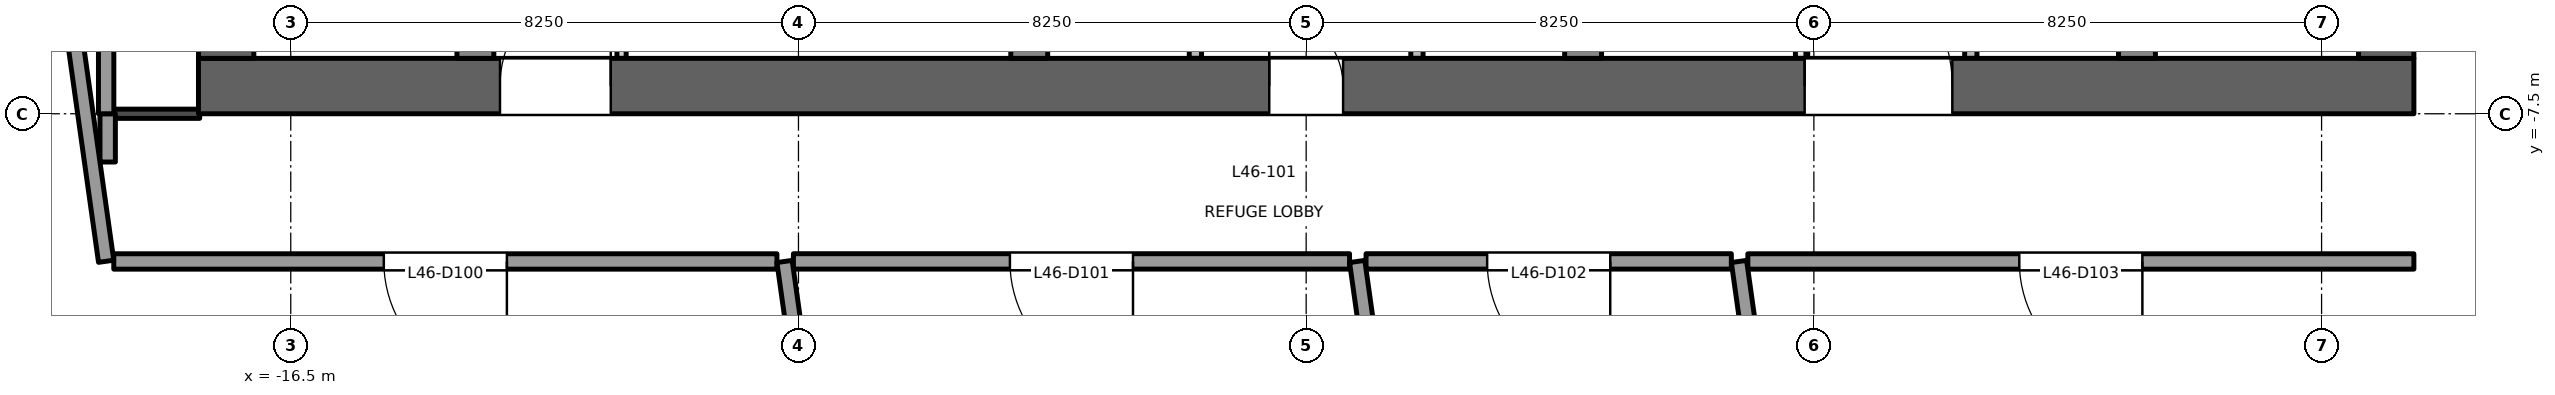
"""IFC4 building model, lengths in metres.
Left out: names, types, materials, properties, quantities, classifications, styles, units other than length and angle.
Written with IfcOpenShell. Run it as: python <this file> out.ifc"""

import sys

from ifc_helpers import new_model, si_unit, direction, frame, frame_2d, origin, place, context, subcontext, project, spatial, rectangle, extrude, element, fill, save


model = new_model("IFC4")
c1 = context("Model", 3, precision=1e-05, world=origin(), true_north=direction((0.0, 1.0)))
c2 = subcontext(c1, "Body", "Model", "MODEL_VIEW")
j1 = project(units=[si_unit("LENGTHUNIT", "METRE"), si_unit("PLANEANGLEUNIT", "RADIAN")], contexts=[c1])
p1 = place(None, origin())
s1 = spatial("IfcSite", under=j1, at=p1, CompositionType="ELEMENT")
p2 = place(p1, origin())
s2 = spatial("IfcBuilding", under=s1, at=p2, CompositionType="ELEMENT")
p3 = place(p2, frame((0.0, 0.0, 199.7)))
s3 = spatial("IfcBuildingStorey", under=s2, at=p3, CompositionType="ELEMENT", Elevation=199.7)
p4 = place(p3, frame((-18.0, -7.05, -0.2), z_axis=(0.0, 0.0, 1.0), x_axis=(1.0, 0.0, 0.0)))
e1 = element("IfcWall", 1, at=p4, inside=s3, PredefinedType="SHEAR", context=c2, shape_type="SweptSolid", body=[
    extrude(rectangle(XDim=36.0, YDim=0.9, at=frame_2d((18.0, 0.0))), origin(), (0.0, 0.0, 1.0), 8.4),
])
p5 = place(p4, frame((4.9, 0.0, 0.2)))
e2 = element("IfcOpeningElement", 2, at=p5, cuts=e1, PredefinedType="OPENING", context=c2, shape_type="SweptSolid", body=[
    extrude(rectangle(XDim=1.8, YDim=2.1, at=frame_2d((0.9, 1.05))), frame((0.0, 0.46, 0.0), z_axis=(0.0, -1.0, 0.0), x_axis=(1.0, 0.0, 0.0)), (0.0, 0.0, 1.0), 0.921),
])
p6 = place(p4, frame((17.4, 0.0, 0.2)))
e3 = element("IfcOpeningElement", 3, at=p6, cuts=e1, PredefinedType="OPENING", context=c2, shape_type="SweptSolid", body=[
    extrude(rectangle(XDim=1.2, YDim=2.1, at=frame_2d((0.6, 1.05))), frame((0.0, 0.46, 0.0), z_axis=(0.0, -1.0, 0.0), x_axis=(1.0, 0.0, 0.0)), (0.0, 0.0, 1.0), 0.921),
])
p7 = place(p4, frame((26.1, 0.0, 0.2)))
e4 = element("IfcOpeningElement", 4, at=p7, cuts=e1, PredefinedType="OPENING", context=c2, shape_type="SweptSolid", body=[
    extrude(rectangle(XDim=2.4, YDim=2.1, at=frame_2d((1.2, 1.05))), frame((0.0, 0.46, 0.0), z_axis=(0.0, -1.0, 0.0), x_axis=(1.0, 0.0, 0.0)), (0.0, 0.0, 1.0), 0.921),
])
p8 = place(p3, frame((-17.55, -6.6, -0.2), z_axis=(0.0, 0.0, 1.0), x_axis=(0.0, 1.0, 0.0)))
e5 = element("IfcWall", 5, at=p8, inside=s3, PredefinedType="SHEAR", context=c2, shape_type="SweptSolid", body=[
    extrude(rectangle(XDim=13.2, YDim=0.9, at=frame_2d((6.6, 0.0))), origin(), (0.0, 0.0, 1.0), 8.4),
])
p9 = place(p8, frame((4.55, 0.0, 0.2)))
e6 = element("IfcOpeningElement", 6, at=p9, cuts=e5, PredefinedType="OPENING", context=c2, shape_type="SweptSolid", body=[
    extrude(rectangle(XDim=1.2, YDim=2.1, at=frame_2d((0.6, 1.05))), frame((0.0, 0.46, 0.0), z_axis=(0.0, -1.0, 0.0), x_axis=(1.0, 0.0, 0.0)), (0.0, 0.0, 1.0), 0.921),
])
p10 = place(p3, frame((17.55, -6.6, -0.2), z_axis=(0.0, 0.0, 1.0), x_axis=(0.0, 1.0, 0.0)))
e7 = element("IfcWall", 7, at=p10, inside=s3, PredefinedType="SHEAR", context=c2, shape_type="SweptSolid", body=[
    extrude(rectangle(XDim=13.2, YDim=0.9, at=frame_2d((6.6, 0.0))), origin(), (0.0, 0.0, 1.0), 8.4),
])
p11 = place(p10, frame((4.55, 0.0, 0.2)))
e8 = element("IfcOpeningElement", 8, at=p11, cuts=e7, PredefinedType="OPENING", context=c2, shape_type="SweptSolid", body=[
    extrude(rectangle(XDim=1.2, YDim=2.1, at=frame_2d((0.6, 1.05))), frame((0.0, 0.46, 0.0), z_axis=(0.0, -1.0, 0.0), x_axis=(1.0, 0.0, 0.0)), (0.0, 0.0, 1.0), 0.921),
])
for number, where, z_axis, x_axis in (
    (9, (-13.5, -6.6, -0.2), (0.0, 0.0, 1.0), (0.0, 1.0, 0.0)),
    (10, (-4.5, -6.6, -0.2), (0.0, 0.0, 1.0), (0.0, 1.0, 0.0)),
    (11, (4.5, -6.6, -0.2), (0.0, 0.0, 1.0), (0.0, 1.0, 0.0)),
    (12, (13.5, -6.6, -0.2), (0.0, 0.0, 1.0), (0.0, 1.0, 0.0)),
):
    element("IfcWall", number, at=place(p3, frame(where, z_axis=z_axis, x_axis=x_axis)), inside=s3, PredefinedType="SHEAR", context=c2, shape_type="SweptSolid", body=[
        extrude(rectangle(XDim=13.2, YDim=0.6, at=frame_2d((6.6, 0.0))), origin(), (0.0, 0.0, 1.0), 8.4),
    ])
p12 = place(p3, frame((-11.125, -6.6, 0.0), z_axis=(0.0, 0.0, 1.0), x_axis=(0.0, 1.0, 0.0)))
e13 = element("IfcWall", 13, at=p12, inside=s3, PredefinedType="PARTITIONING", context=c2, shape_type="SweptSolid", body=[
    extrude(rectangle(XDim=13.2, YDim=0.15, at=frame_2d((6.6, 0.0))), origin(), (0.0, 0.0, 1.0), 8.2),
])
p13 = place(p12, frame((2.85, 0.0, 0.0)))
e14 = element("IfcOpeningElement", 14, at=p13, cuts=e13, PredefinedType="OPENING", context=c2, shape_type="SweptSolid", body=[
    extrude(rectangle(XDim=0.9, YDim=2.1, at=frame_2d((0.45, 1.05))), frame((0.0, 0.085, 0.0), z_axis=(0.0, -1.0, 0.0), x_axis=(1.0, 0.0, 0.0)), (0.0, 0.0, 1.0), 0.171),
])
p14 = place(p12, frame((7.8, 0.0, 0.0)))
e15 = element("IfcOpeningElement", 15, at=p14, cuts=e13, PredefinedType="OPENING", context=c2, shape_type="SweptSolid", body=[
    extrude(rectangle(XDim=0.9, YDim=2.1, at=frame_2d((0.45, 1.05))), frame((0.0, 0.085, 0.0), z_axis=(0.0, -1.0, 0.0), x_axis=(1.0, 0.0, 0.0)), (0.0, 0.0, 1.0), 0.171),
])
p15 = place(p12, frame((11.1, 0.0, 0.0)))
e16 = element("IfcOpeningElement", 16, at=p15, cuts=e13, PredefinedType="OPENING", context=c2, shape_type="SweptSolid", body=[
    extrude(rectangle(XDim=0.9, YDim=2.1, at=frame_2d((0.45, 1.05))), frame((0.0, 0.085, 0.0), z_axis=(0.0, -1.0, 0.0), x_axis=(1.0, 0.0, 0.0)), (0.0, 0.0, 1.0), 0.171),
])
p16 = place(p3, frame((-1.8, -6.6, 0.0), z_axis=(0.0, 0.0, 1.0), x_axis=(0.0, 1.0, 0.0)))
e17 = element("IfcWall", 17, at=p16, inside=s3, PredefinedType="PARTITIONING", context=c2, shape_type="SweptSolid", body=[
    extrude(rectangle(XDim=13.2, YDim=0.2, at=frame_2d((6.6, 0.0))), origin(), (0.0, 0.0, 1.0), 8.2),
])
p17 = place(p16, frame((0.55, 0.0, 0.0)))
e18 = element("IfcOpeningElement", 18, at=p17, cuts=e17, PredefinedType="OPENING", context=c2, shape_type="SweptSolid", body=[
    extrude(rectangle(XDim=0.9, YDim=2.1, at=frame_2d((0.45, 1.05))), frame((0.0, 0.111, 0.0), z_axis=(0.0, -1.0, 0.0), x_axis=(1.0, 0.0, 0.0)), (0.0, 0.0, 1.0), 0.221),
])
p18 = place(p3, frame((1.8, -6.6, 0.0), z_axis=(0.0, 0.0, 1.0), x_axis=(0.0, 1.0, 0.0)))
e19 = element("IfcWall", 19, at=p18, inside=s3, PredefinedType="PARTITIONING", context=c2, shape_type="SweptSolid", body=[
    extrude(rectangle(XDim=13.2, YDim=0.2, at=frame_2d((6.6, 0.0))), origin(), (0.0, 0.0, 1.0), 8.2),
])
p19 = place(p18, frame((0.55, 0.0, 0.0)))
e20 = element("IfcOpeningElement", 20, at=p19, cuts=e19, PredefinedType="OPENING", context=c2, shape_type="SweptSolid", body=[
    extrude(rectangle(XDim=0.9, YDim=2.1, at=frame_2d((0.45, 1.05))), frame((0.0, 0.111, 0.0), z_axis=(0.0, -1.0, 0.0), x_axis=(1.0, 0.0, 0.0)), (0.0, 0.0, 1.0), 0.221),
])
p20 = place(p3, frame((8.05, -6.6, 0.0), z_axis=(0.0, 0.0, 1.0), x_axis=(0.0, 1.0, 0.0)))
e21 = element("IfcWall", 21, at=p20, inside=s3, PredefinedType="PARTITIONING", context=c2, shape_type="SweptSolid", body=[
    extrude(rectangle(XDim=13.2, YDim=0.2, at=frame_2d((6.6, 0.0))), origin(), (0.0, 0.0, 1.0), 8.2),
])
p21 = place(p20, frame((0.298, 0.0, 0.0)))
e22 = element("IfcOpeningElement", 22, at=p21, cuts=e21, PredefinedType="OPENING", context=c2, shape_type="SweptSolid", body=[
    extrude(rectangle(XDim=0.9, YDim=2.1, at=frame_2d((0.45, 1.05))), frame((0.0, 0.111, 0.0), z_axis=(0.0, -1.0, 0.0), x_axis=(1.0, 0.0, 0.0)), (0.0, 0.0, 1.0), 0.221),
])
p22 = place(p20, frame((2.066, 0.0, 0.0)))
e23 = element("IfcOpeningElement", 23, at=p22, cuts=e21, PredefinedType="OPENING", context=c2, shape_type="SweptSolid", body=[
    extrude(rectangle(XDim=0.9, YDim=2.1, at=frame_2d((0.45, 1.05))), frame((0.0, 0.111, 0.0), z_axis=(0.0, -1.0, 0.0), x_axis=(1.0, 0.0, 0.0)), (0.0, 0.0, 1.0), 0.221),
])
p23 = place(p20, frame((3.834, 0.0, 0.0)))
e24 = element("IfcOpeningElement", 24, at=p23, cuts=e21, PredefinedType="OPENING", context=c2, shape_type="SweptSolid", body=[
    extrude(rectangle(XDim=0.9, YDim=2.1, at=frame_2d((0.45, 1.05))), frame((0.0, 0.111, 0.0), z_axis=(0.0, -1.0, 0.0), x_axis=(1.0, 0.0, 0.0)), (0.0, 0.0, 1.0), 0.221),
])
p24 = place(p20, frame((5.466, 0.0, 0.0)))
e25 = element("IfcOpeningElement", 25, at=p24, cuts=e21, PredefinedType="OPENING", context=c2, shape_type="SweptSolid", body=[
    extrude(rectangle(XDim=0.9, YDim=2.1, at=frame_2d((0.45, 1.05))), frame((0.0, 0.111, 0.0), z_axis=(0.0, -1.0, 0.0), x_axis=(1.0, 0.0, 0.0)), (0.0, 0.0, 1.0), 0.221),
])
p25 = place(p20, frame((11.9, 0.0, 0.0)))
e26 = element("IfcOpeningElement", 26, at=p25, cuts=e21, PredefinedType="OPENING", context=c2, shape_type="SweptSolid", body=[
    extrude(rectangle(XDim=1.1, YDim=2.1, at=frame_2d((0.55, 1.05))), frame((0.0, 0.111, 0.0), z_axis=(0.0, -1.0, 0.0), x_axis=(1.0, 0.0, 0.0)), (0.0, 0.0, 1.0), 0.221),
])
p26 = place(p3, frame((10.8, -6.6, 0.0), z_axis=(0.0, 0.0, 1.0), x_axis=(0.0, 1.0, 0.0)))
e27 = element("IfcWall", 27, at=p26, inside=s3, PredefinedType="PARTITIONING", context=c2, shape_type="SweptSolid", body=[
    extrude(rectangle(XDim=13.2, YDim=0.2, at=frame_2d((6.6, 0.0))), origin(), (0.0, 0.0, 1.0), 8.2),
])
p27 = place(p26, frame((0.7, 0.0, 0.0)))
e28 = element("IfcOpeningElement", 28, at=p27, cuts=e27, PredefinedType="OPENING", context=c2, shape_type="SweptSolid", body=[
    extrude(rectangle(XDim=1.2, YDim=2.1, at=frame_2d((0.6, 1.05))), frame((0.0, 0.111, 0.0), z_axis=(0.0, -1.0, 0.0), x_axis=(1.0, 0.0, 0.0)), (0.0, 0.0, 1.0), 0.221),
])
p28 = place(p26, frame((8.67, 0.0, 0.0)))
e29 = element("IfcOpeningElement", 29, at=p28, cuts=e27, PredefinedType="OPENING", context=c2, shape_type="SweptSolid", body=[
    extrude(rectangle(XDim=0.9, YDim=2.1, at=frame_2d((0.45, 1.05))), frame((0.0, 0.111, 0.0), z_axis=(0.0, -1.0, 0.0), x_axis=(1.0, 0.0, 0.0)), (0.0, 0.0, 1.0), 0.221),
])
p29 = place(p26, frame((10.11, 0.0, 0.0)))
e30 = element("IfcOpeningElement", 30, at=p29, cuts=e27, PredefinedType="OPENING", context=c2, shape_type="SweptSolid", body=[
    extrude(rectangle(XDim=0.9, YDim=2.1, at=frame_2d((0.45, 1.05))), frame((0.0, 0.111, 0.0), z_axis=(0.0, -1.0, 0.0), x_axis=(1.0, 0.0, 0.0)), (0.0, 0.0, 1.0), 0.221),
])
p30 = place(p26, frame((11.79, 0.0, 0.0)))
e31 = element("IfcOpeningElement", 31, at=p30, cuts=e27, PredefinedType="OPENING", context=c2, shape_type="SweptSolid", body=[
    extrude(rectangle(XDim=0.9, YDim=2.1, at=frame_2d((0.45, 1.05))), frame((0.0, 0.111, 0.0), z_axis=(0.0, -1.0, 0.0), x_axis=(1.0, 0.0, 0.0)), (0.0, 0.0, 1.0), 0.221),
])
p31 = place(p3, frame((-19.375, -7.5, 0.0), z_axis=(0.0, 0.0, 1.0), x_axis=(1.0, 0.0, 0.0)))
e32 = element("IfcWall", 32, at=p31, inside=s3, PredefinedType="PARTITIONING", context=c2, shape_type="SweptSolid", body=[
    extrude(rectangle(XDim=1.395, YDim=0.15, at=frame_2d((0.698, 0.0))), origin(), (0.0, 0.0, 1.0), 8.2),
])
p32 = place(p3, frame((-8.6, -9.9, 0.0), z_axis=(0.0, 0.0, 1.0), x_axis=(-1.0, 0.0, 0.0)))
e33 = element("IfcWall", 33, at=p32, inside=s3, PredefinedType="PARTITIONING", context=c2, shape_type="SweptSolid", body=[
    extrude(rectangle(XDim=10.776, YDim=0.25, at=frame_2d((5.388, 0.0))), origin(), (0.0, 0.0, 1.0), 7.3),
])
p33 = place(p32, frame((4.388, 0.0, 0.0)))
e34 = element("IfcOpeningElement", 34, at=p33, cuts=e33, PredefinedType="OPENING", context=c2, shape_type="SweptSolid", body=[
    extrude(rectangle(XDim=2.0, YDim=2.1, at=frame_2d((1.0, 1.05))), frame((0.0, 0.135, 0.0), z_axis=(0.0, -1.0, 0.0), x_axis=(1.0, 0.0, 0.0)), (0.0, 0.0, 1.0), 0.271),
])
p34 = place(p3, frame((0.705, -9.899, 0.0), z_axis=(0.0, 0.0, 1.0), x_axis=(-1.0, 0.0, 0.0)))
e35 = element("IfcWall", 35, at=p34, inside=s3, PredefinedType="PARTITIONING", context=c2, shape_type="SweptSolid", body=[
    extrude(rectangle(XDim=9.037, YDim=0.25, at=frame_2d((4.519, 0.0))), origin(), (0.0, 0.0, 1.0), 7.3),
])
p35 = place(p34, frame((3.519, 0.0, 0.0)))
e36 = element("IfcOpeningElement", 36, at=p35, cuts=e35, PredefinedType="OPENING", context=c2, shape_type="SweptSolid", body=[
    extrude(rectangle(XDim=2.0, YDim=2.1, at=frame_2d((1.0, 1.05))), frame((0.0, 0.135, 0.0), z_axis=(0.0, -1.0, 0.0), x_axis=(1.0, 0.0, 0.0)), (0.0, 0.0, 1.0), 0.271),
])
p36 = place(p3, frame((6.909, -9.899, 0.0), z_axis=(0.0, 0.0, 1.0), x_axis=(-1.0, 0.0, 0.0)))
e37 = element("IfcWall", 37, at=p36, inside=s3, PredefinedType="PARTITIONING", context=c2, shape_type="SweptSolid", body=[
    extrude(rectangle(XDim=5.936, YDim=0.25, at=frame_2d((2.968, 0.0))), origin(), (0.0, 0.0, 1.0), 7.4),
])
p37 = place(p36, frame((1.968, 0.0, 0.0)))
e38 = element("IfcOpeningElement", 38, at=p37, cuts=e37, PredefinedType="OPENING", context=c2, shape_type="SweptSolid", body=[
    extrude(rectangle(XDim=2.0, YDim=2.1, at=frame_2d((1.0, 1.05))), frame((0.0, 0.135, 0.0), z_axis=(0.0, -1.0, 0.0), x_axis=(1.0, 0.0, 0.0)), (0.0, 0.0, 1.0), 0.271),
])
p38 = place(p3, frame((18.0, -9.9, 0.0), z_axis=(0.0, 0.0, 1.0), x_axis=(-1.0, 0.0, 0.0)))
e39 = element("IfcWall", 39, at=p38, inside=s3, PredefinedType="PARTITIONING", context=c2, shape_type="SweptSolid", body=[
    extrude(rectangle(XDim=10.823, YDim=0.25, at=frame_2d((5.412, 0.0))), origin(), (0.0, 0.0, 1.0), 7.4),
])
p39 = place(p38, frame((4.412, 0.0, 0.0)))
e40 = element("IfcOpeningElement", 40, at=p39, cuts=e39, PredefinedType="OPENING", context=c2, shape_type="SweptSolid", body=[
    extrude(rectangle(XDim=2.0, YDim=2.1, at=frame_2d((1.0, 1.05))), frame((0.0, 0.135, 0.0), z_axis=(0.0, -1.0, 0.0), x_axis=(1.0, 0.0, 0.0)), (0.0, 0.0, 1.0), 0.271),
])
p40 = place(p3, frame((-19.475, -8.284, 0.0), z_axis=(0.0, 0.0, 1.0), x_axis=(0.0, 1.0, 0.0)))
e41 = element("IfcWall", 41, at=p40, inside=s3, PredefinedType="PARTITIONING", context=c2, shape_type="SweptSolid", body=[
    extrude(rectangle(XDim=0.784, YDim=0.25, at=frame_2d((0.392, 0.0))), origin(), (0.0, 0.0, 1.0), 8.2),
])
p41 = place(p3, frame((-19.5, -7.5, 0.0), z_axis=(0.0, 0.0, 1.0), x_axis=(0.0, 1.0, 0.0)))
e42 = element("IfcWall", 42, at=p41, inside=s3, PredefinedType="PARTITIONING", context=c2, shape_type="SweptSolid", body=[
    extrude(rectangle(XDim=16.5, YDim=0.25, at=frame_2d((8.25, 0.0))), origin(), (0.0, 0.0, 1.0), 6.15),
])
p42 = place(p41, frame((7.25, 0.0, 0.0)))
e43 = element("IfcOpeningElement", 43, at=p42, cuts=e42, PredefinedType="OPENING", context=c2, shape_type="SweptSolid", body=[
    extrude(rectangle(XDim=2.0, YDim=2.1, at=frame_2d((1.0, 1.05))), frame((0.0, 0.135, 0.0), z_axis=(0.0, -1.0, 0.0), x_axis=(1.0, 0.0, 0.0)), (0.0, 0.0, 1.0), 0.271),
])
p43 = place(p3, frame((-8.476, -9.9, 0.0), z_axis=(0.0, 0.0, 1.0), x_axis=(0.139135905406, -0.990273295523, 0.0)))
e44 = element("IfcWall", 44, at=p43, inside=s3, PredefinedType="PARTITIONING", context=c2, shape_type="SweptSolid", body=[
    extrude(rectangle(XDim=15.287, YDim=0.25, at=frame_2d((7.644, 0.0))), origin(), (0.0, 0.0, 1.0), 8.2),
])
p44 = place(p3, frame((-21.125, 1.665, 0.0), z_axis=(0.0, 0.0, 1.0), x_axis=(0.139178578933, -0.990267298847, 0.0)))
e45 = element("IfcWall", 45, at=p44, inside=s3, PredefinedType="PARTITIONING", context=c2, shape_type="SweptSolid", body=[
    extrude(rectangle(XDim=11.676, YDim=0.25, at=frame_2d((5.838, 0.0))), origin(), (0.0, 0.0, 1.0), 6.15),
])
p45 = place(p3, frame((0.829, -9.9, 0.0), z_axis=(0.0, 0.0, 1.0), x_axis=(0.139217671259, -0.990261803772, 0.0)))
e46 = element("IfcWall", 46, at=p45, inside=s3, PredefinedType="PARTITIONING", context=c2, shape_type="SweptSolid", body=[
    extrude(rectangle(XDim=13.992, YDim=0.25, at=frame_2d((6.996, 0.0))), origin(), (0.0, 0.0, 1.0), 8.2),
])
p46 = place(p3, frame((7.033, -9.9, 0.0), z_axis=(0.0, 0.0, 1.0), x_axis=(0.139171632447, -0.990268275127, 0.0)))
e47 = element("IfcWall", 47, at=p46, inside=s3, PredefinedType="PARTITIONING", context=c2, shape_type="SweptSolid", body=[
    extrude(rectangle(XDim=13.129, YDim=0.25, at=frame_2d((6.564, 0.0))), origin(), (0.0, 0.0, 1.0), 7.5),
])
p47 = place(p5, origin())
e48 = element("IfcDoor", 48, at=p47, inside=s3, OperationType="SINGLE_SWING_RIGHT", PredefinedType="DOOR", context=c2, shape_type="SweptSolid", body=[
    extrude(rectangle(XDim=1.8, YDim=2.1, at=frame_2d((0.9, 1.05))), frame((0.0, 0.025, 0.0), z_axis=(0.0, -1.0, 0.0), x_axis=(1.0, 0.0, 0.0)), (0.0, 0.0, 1.0), 0.05),
])
fill(e2, e48)
p48 = place(p6, origin())
e49 = element("IfcDoor", 49, at=p48, inside=s3, OperationType="SINGLE_SWING_LEFT", PredefinedType="DOOR", context=c2, shape_type="SweptSolid", body=[
    extrude(rectangle(XDim=1.2, YDim=2.1, at=frame_2d((0.6, 1.05))), frame((0.0, 0.025, 0.0), z_axis=(0.0, -1.0, 0.0), x_axis=(1.0, 0.0, 0.0)), (0.0, 0.0, 1.0), 0.05),
])
fill(e3, e49)
p49 = place(p7, origin())
e50 = element("IfcDoor", 50, at=p49, inside=s3, OperationType="DOUBLE_DOOR_DOUBLE_SWING", PredefinedType="DOOR", context=c2, shape_type="SweptSolid", body=[
    extrude(rectangle(XDim=2.4, YDim=2.1, at=frame_2d((1.2, 1.05))), frame((0.0, 0.025, 0.0), z_axis=(0.0, -1.0, 0.0), x_axis=(1.0, 0.0, 0.0)), (0.0, 0.0, 1.0), 0.05),
])
fill(e4, e50)
p50 = place(p33, origin())
e51 = element("IfcDoor", 51, at=p50, inside=s3, OperationType="DOUBLE_DOOR_SINGLE_SWING", PredefinedType="DOOR", context=c2, shape_type="SweptSolid", body=[
    extrude(rectangle(XDim=2.0, YDim=2.1, at=frame_2d((1.0, 1.05))), frame((0.0, 0.025, 0.0), z_axis=(0.0, -1.0, 0.0), x_axis=(1.0, 0.0, 0.0)), (0.0, 0.0, 1.0), 0.05),
])
fill(e34, e51)
p51 = place(p35, origin())
e52 = element("IfcDoor", 52, at=p51, inside=s3, OperationType="DOUBLE_DOOR_SINGLE_SWING", PredefinedType="DOOR", context=c2, shape_type="SweptSolid", body=[
    extrude(rectangle(XDim=2.0, YDim=2.1, at=frame_2d((1.0, 1.05))), frame((0.0, 0.025, 0.0), z_axis=(0.0, -1.0, 0.0), x_axis=(1.0, 0.0, 0.0)), (0.0, 0.0, 1.0), 0.05),
])
fill(e36, e52)
p52 = place(p37, origin())
e53 = element("IfcDoor", 53, at=p52, inside=s3, OperationType="DOUBLE_DOOR_SINGLE_SWING", PredefinedType="DOOR", context=c2, shape_type="SweptSolid", body=[
    extrude(rectangle(XDim=2.0, YDim=2.1, at=frame_2d((1.0, 1.05))), frame((0.0, 0.025, 0.0), z_axis=(0.0, -1.0, 0.0), x_axis=(1.0, 0.0, 0.0)), (0.0, 0.0, 1.0), 0.05),
])
fill(e38, e53)
p53 = place(p39, origin())
e54 = element("IfcDoor", 54, at=p53, inside=s3, OperationType="DOUBLE_DOOR_SINGLE_SWING", PredefinedType="DOOR", context=c2, shape_type="SweptSolid", body=[
    extrude(rectangle(XDim=2.0, YDim=2.1, at=frame_2d((1.0, 1.05))), frame((0.0, 0.025, 0.0), z_axis=(0.0, -1.0, 0.0), x_axis=(1.0, 0.0, 0.0)), (0.0, 0.0, 1.0), 0.05),
])
fill(e40, e54)
save(model, sys.argv[1])
